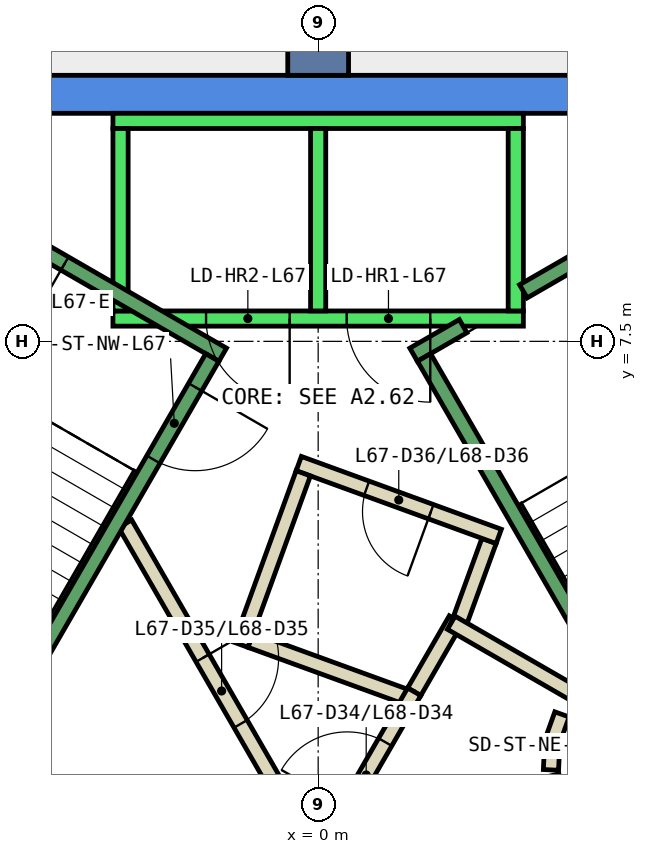
"""IFC4 building model, lengths in metres.
Left out: names, types, materials, properties, quantities, classifications, styles, units other than length and angle.
Written with IfcOpenShell. Run it as: python <this file> out.ifc"""

import sys

from ifc_helpers import new_model, si_unit, direction, frame, frame_2d, origin, place, context, subcontext, project, spatial, polyline, rectangle, outline, extrude, element, fill, save


model = new_model("IFC4")
c1 = context("Model", 3, precision=1e-05, world=origin(), true_north=direction((0.0, 1.0)))
c2 = subcontext(c1, "Body", "Model", "MODEL_VIEW")
j1 = project(units=[si_unit("LENGTHUNIT", "METRE"), si_unit("PLANEANGLEUNIT", "RADIAN")], contexts=[c1])
p1 = place(None, origin())
s1 = spatial("IfcSite", under=j1, at=p1, CompositionType="ELEMENT")
p2 = place(p1, origin())
s2 = spatial("IfcBuilding", under=s1, at=p2, CompositionType="ELEMENT")
p3 = place(p2, frame((0.0, 0.0, 290.0)))
s3 = spatial("IfcBuildingStorey", under=s2, at=p3, CompositionType="ELEMENT", Elevation=290.0)
p4 = place(p3, frame((0.0, 0.0, -0.34)))
e1 = element("IfcWall", 1, at=p4, inside=s3, PredefinedType="SHEAR", context=c2, shape_type="SweptSolid", body=[
    extrude(outline(polyline([(4.907, 11.0), (-4.907, 11.0), (-4.619, 10.5), (4.619, 10.5), (4.907, 11.0)])), origin(), (0.0, 0.0, 1.0), 3.6),
])
p5 = place(p3, frame((0.0, 11.0, -0.34), z_axis=(0.0, 0.0, 1.0), x_axis=(0.0, 1.0, 0.0)))
e2 = element("IfcWall", 2, at=p5, inside=s3, PredefinedType="SHEAR", context=c2, shape_type="SweptSolid", body=[
    extrude(rectangle(XDim=9.0, YDim=0.8, at=frame_2d((4.5, 0.0))), origin(), (0.0, 0.0, 1.0), 3.6),
])
p6 = place(p3, frame((1.264, 2.89, 0.0), z_axis=(0.0, 0.0, 1.0), x_axis=(0.500043792738, 0.866000118559, 0.0)))
e3 = element("IfcWall", 3, at=p6, inside=s3, PredefinedType="PARTITIONING", context=c2, shape_type="SweptSolid", body=[
    extrude(rectangle(XDim=1.096, YDim=0.2, at=frame_2d((0.548, 0.0))), origin(), (0.0, 0.0, 1.0), 3.26),
])
p7 = place(p3, frame((1.838, 3.748, 0.0), z_axis=(0.0, 0.0, 1.0), x_axis=(0.342266462435, 0.939602931398, 0.0)))
e4 = element("IfcWall", 4, at=p7, inside=s3, PredefinedType="PARTITIONING", context=c2, shape_type="SweptSolid", body=[
    extrude(rectangle(XDim=1.198, YDim=0.2, at=frame_2d((0.599, 0.0))), origin(), (0.0, 0.0, 1.0), 3.26),
])
p8 = place(p3, frame((2.376, 4.934, 0.0), z_axis=(0.0, 0.0, 1.0), x_axis=(-0.939640574808, 0.342163104635, 0.0)))
e5 = element("IfcWall", 5, at=p8, inside=s3, PredefinedType="PARTITIONING", context=c2, shape_type="SweptSolid", body=[
    extrude(rectangle(XDim=2.8, YDim=0.2, at=frame_2d((1.4, 0.0))), origin(), (0.0, 0.0, 1.0), 3.26),
])
p9 = place(p8, frame((0.95, 0.0, 0.0)))
e6 = element("IfcOpeningElement", 6, at=p9, cuts=e5, PredefinedType="OPENING", context=c2, shape_type="SweptSolid", body=[
    extrude(rectangle(XDim=0.9, YDim=2.1, at=frame_2d((0.45, 1.05))), frame((0.0, 0.11, 0.0), z_axis=(0.0, -1.0, 0.0), x_axis=(1.0, 0.0, 0.0)), (0.0, 0.0, 1.0), 0.22),
])
p10 = place(p3, frame((-0.196, 5.764, 0.0), z_axis=(0.0, 0.0, 1.0), x_axis=(-0.34165322761, -0.939826086073, 0.0)))
e7 = element("IfcWall", 7, at=p10, inside=s3, PredefinedType="PARTITIONING", context=c2, shape_type="SweptSolid", body=[
    extrude(rectangle(XDim=2.4, YDim=0.2, at=frame_2d((1.2, 0.0))), origin(), (0.0, 0.0, 1.0), 3.26),
])
p11 = place(p3, frame((-0.888, 3.568, 0.0), z_axis=(0.0, 0.0, 1.0), x_axis=(0.939685034098, -0.34204098686, 0.0)))
e8 = element("IfcWall", 8, at=p11, inside=s3, PredefinedType="PARTITIONING", context=c2, shape_type="SweptSolid", body=[
    extrude(rectangle(XDim=2.237, YDim=0.2, at=frame_2d((1.119, 0.0))), origin(), (0.0, 0.0, 1.0), 3.26),
])
p12 = place(p3, frame((2.62, 14.526, 0.0), z_axis=(0.0, 0.0, 1.0), x_axis=(0.527726136463, -0.84941457775, 0.0)))
e9 = element("IfcWall", 9, at=p12, inside=s3, PredefinedType="PARTITIONING", context=c2, shape_type="SweptSolid", body=[
    extrude(rectangle(XDim=4.165, YDim=0.2, at=frame_2d((2.083, 0.0))), origin(), (0.0, 0.0, 1.0), 2.4),
])
p13 = place(p12, frame((1.583, 0.0, 0.0)))
e10 = element("IfcOpeningElement", 10, at=p13, cuts=e9, PredefinedType="OPENING", context=c2, shape_type="SweptSolid", body=[
    extrude(rectangle(XDim=1.0, YDim=2.1, at=frame_2d((0.5, 1.05))), frame((0.0, 0.11, 0.0), z_axis=(0.0, -1.0, 0.0), x_axis=(1.0, 0.0, 0.0)), (0.0, 0.0, 1.0), 0.22),
])
p14 = place(p3, frame((0.05, 0.787, 0.0), z_axis=(0.0, 0.0, 1.0), x_axis=(0.499945861543, 0.866056658381, 0.0)))
e11 = element("IfcWall", 11, at=p14, inside=s3, PredefinedType="PARTITIONING", context=c2, shape_type="SweptSolid", body=[
    extrude(rectangle(XDim=2.428, YDim=0.2, at=frame_2d((1.214, 0.0))), origin(), (0.0, 0.0, 1.0), 3.26),
])
p15 = place(p14, frame((0.664, 0.0, 0.0)))
e12 = element("IfcOpeningElement", 12, at=p15, cuts=e11, PredefinedType="OPENING", context=c2, shape_type="SweptSolid", body=[
    extrude(rectangle(XDim=1.0, YDim=2.1, at=frame_2d((0.5, 1.05))), frame((0.0, 0.11, 0.0), z_axis=(0.0, -1.0, 0.0), x_axis=(1.0, 0.0, 0.0)), (0.0, 0.0, 1.0), 0.22),
])
p16 = place(p3, frame((1.751, 3.798, 0.0), z_axis=(0.0, 0.0, 1.0), x_axis=(0.866091650241, -0.499885240213, 0.0)))
e13 = element("IfcWall", 13, at=p16, inside=s3, PredefinedType="PARTITIONING", context=c2, shape_type="SweptSolid", body=[
    extrude(rectangle(XDim=1.991, YDim=0.2, at=frame_2d((0.995, 0.0))), origin(), (0.0, 0.0, 1.0), 3.26),
])
p17 = place(p3, frame((3.208, 2.592, 0.0), z_axis=(0.0, 0.0, 1.0), x_axis=(-0.337388820924, -0.941365382578, 0.0)))
e14 = element("IfcWall", 14, at=p17, inside=s3, PredefinedType="PARTITIONING", context=c2, shape_type="SweptSolid", body=[
    extrude(rectangle(XDim=0.338, YDim=0.2, at=frame_2d((0.169, 0.0))), origin(), (0.0, 0.0, 1.0), 3.26),
])
p18 = place(p3, frame((3.079, 2.199, 0.0), z_axis=(0.0, 0.0, 1.0), x_axis=(-0.047771483479, -0.998858290933, 0.0)))
e15 = element("IfcWall", 15, at=p18, inside=s3, PredefinedType="PARTITIONING", context=c2, shape_type="SweptSolid", body=[
    extrude(rectangle(XDim=0.337, YDim=0.2, at=frame_2d((0.169, 0.0))), origin(), (0.0, 0.0, 1.0), 3.26),
])
p19 = place(p3, frame((3.07, 1.786, 0.0), z_axis=(0.0, 0.0, 1.0), x_axis=(0.242705583207, -0.970099994784, 0.0)))
e16 = element("IfcWall", 16, at=p19, inside=s3, PredefinedType="PARTITIONING", context=c2, shape_type="SweptSolid", body=[
    extrude(rectangle(XDim=0.338, YDim=0.2, at=frame_2d((0.169, 0.0))), origin(), (0.0, 0.0, 1.0), 3.26),
])
p20 = place(p3, frame((-2.54, 5.1, 0.0), z_axis=(0.0, 0.0, 1.0), x_axis=(0.499925051871, -0.866068670783, 0.0)))
e17 = element("IfcWall", 17, at=p20, inside=s3, PredefinedType="PARTITIONING", context=c2, shape_type="SweptSolid", body=[
    extrude(rectangle(XDim=5.181, YDim=0.2, at=frame_2d((2.59, 0.0))), origin(), (0.0, 0.0, 1.0), 3.26),
])
p21 = place(p20, frame((2.04, 0.0, 0.0)))
e18 = element("IfcOpeningElement", 18, at=p21, cuts=e17, PredefinedType="OPENING", context=c2, shape_type="SweptSolid", body=[
    extrude(rectangle(XDim=1.0, YDim=2.1, at=frame_2d((0.5, 1.05))), frame((0.0, 0.11, 0.0), z_axis=(0.0, -1.0, 0.0), x_axis=(1.0, 0.0, 0.0)), (0.0, 0.0, 1.0), 0.22),
])
p22 = place(p3, frame((2.7, 7.8, 0.0), z_axis=(0.0, 0.0, 1.0), x_axis=(-1.0, 0.0, 0.0)))
e19 = element("IfcWall", 19, at=p22, inside=s3, PredefinedType="STANDARD", context=c2, shape_type="SweptSolid", body=[
    extrude(rectangle(XDim=5.4, YDim=0.2, at=frame_2d((2.7, 0.0))), origin(), (0.0, 0.0, 1.0), 3.26),
])
p23 = place(p22, frame((1.225, 0.0, 0.0)))
e20 = element("IfcOpeningElement", 20, at=p23, cuts=e19, PredefinedType="OPENING", context=c2, shape_type="SweptSolid", body=[
    extrude(rectangle(XDim=1.1, YDim=2.1, at=frame_2d((0.55, 1.05))), frame((0.0, 0.11, 0.0), z_axis=(0.0, -1.0, 0.0), x_axis=(1.0, 0.0, 0.0)), (0.0, 0.0, 1.0), 0.22),
])
p24 = place(p22, frame((3.075, 0.0, 0.0)))
e21 = element("IfcOpeningElement", 21, at=p24, cuts=e19, PredefinedType="OPENING", context=c2, shape_type="SweptSolid", body=[
    extrude(rectangle(XDim=1.1, YDim=2.1, at=frame_2d((0.55, 1.05))), frame((0.0, 0.11, 0.0), z_axis=(0.0, -1.0, 0.0), x_axis=(1.0, 0.0, 0.0)), (0.0, 0.0, 1.0), 0.22),
])
p25 = place(p3, frame((2.7, 10.4, 0.0), z_axis=(0.0, 0.0, 1.0), x_axis=(-1.0, 0.0, 0.0)))
e22 = element("IfcWall", 22, at=p25, inside=s3, PredefinedType="STANDARD", context=c2, shape_type="SweptSolid", body=[
    extrude(rectangle(XDim=5.4, YDim=0.2, at=frame_2d((2.7, 0.0))), origin(), (0.0, 0.0, 1.0), 3.26),
])
for number, where, z_axis, x_axis in (
    (23, (2.6, 7.9, 0.0), (0.0, 0.0, 1.0), (0.0, 1.0, 0.0)),
    (24, (0.0, 7.9, 0.0), (0.0, 0.0, 1.0), (0.0, 1.0, 0.0)),
    (25, (-2.6, 7.9, 0.0), (0.0, 0.0, 1.0), (0.0, 1.0, 0.0)),
):
    element("IfcWall", number, at=place(p3, frame(where, z_axis=z_axis, x_axis=x_axis)), inside=s3, PredefinedType="STANDARD", context=c2, shape_type="SweptSolid", body=[
        extrude(rectangle(XDim=2.4, YDim=0.2, at=frame_2d((1.2, 0.0))), origin(), (0.0, 0.0, 1.0), 3.26),
    ])
p26 = place(p3, frame((-5.94, 2.188, 0.0), z_axis=(0.0, 0.0, 1.0), x_axis=(0.500034260056, -0.866005622828, 0.0)))
e26 = element("IfcWall", 26, at=p26, inside=s3, PredefinedType="STANDARD", context=c2, shape_type="SweptSolid", body=[
    extrude(rectangle(XDim=5.399, YDim=0.2, at=frame_2d((2.7, 0.0))), origin(), (0.0, 0.0, 1.0), 3.26),
])
p27 = place(p26, frame((3.075, 0.0, 0.0)))
e27 = element("IfcOpeningElement", 27, at=p27, cuts=e26, PredefinedType="OPENING", context=c2, shape_type="SweptSolid", body=[
    extrude(rectangle(XDim=1.1, YDim=2.1, at=frame_2d((0.55, 1.05))), frame((0.0, 0.11, 0.0), z_axis=(0.0, -1.0, 0.0), x_axis=(1.0, 0.0, 0.0)), (0.0, 0.0, 1.0), 0.22),
])
p28 = place(p26, frame((1.225, 0.0, 0.0)))
e28 = element("IfcOpeningElement", 28, at=p28, cuts=e26, PredefinedType="OPENING", context=c2, shape_type="SweptSolid", body=[
    extrude(rectangle(XDim=1.1, YDim=2.1, at=frame_2d((0.55, 1.05))), frame((0.0, 0.11, 0.0), z_axis=(0.0, -1.0, 0.0), x_axis=(1.0, 0.0, 0.0)), (0.0, 0.0, 1.0), 0.22),
])
p29 = place(p3, frame((3.24, -2.488, 0.0), z_axis=(0.0, 0.0, 1.0), x_axis=(0.500034260056, 0.866005622828, 0.0)))
e29 = element("IfcWall", 29, at=p29, inside=s3, PredefinedType="STANDARD", context=c2, shape_type="SweptSolid", body=[
    extrude(rectangle(XDim=5.399, YDim=0.2, at=frame_2d((2.7, 0.0))), origin(), (0.0, 0.0, 1.0), 3.26),
])
p30 = place(p29, frame((3.225, 0.0, 0.0)))
e30 = element("IfcOpeningElement", 30, at=p30, cuts=e29, PredefinedType="OPENING", context=c2, shape_type="SweptSolid", body=[
    extrude(rectangle(XDim=1.1, YDim=2.1, at=frame_2d((0.55, 1.05))), frame((0.0, 0.11, 0.0), z_axis=(0.0, -1.0, 0.0), x_axis=(1.0, 0.0, 0.0)), (0.0, 0.0, 1.0), 0.22),
])
p31 = place(p29, frame((1.225, 0.0, 0.0)))
e31 = element("IfcOpeningElement", 31, at=p31, cuts=e29, PredefinedType="OPENING", context=c2, shape_type="SweptSolid", body=[
    extrude(rectangle(XDim=1.1, YDim=2.1, at=frame_2d((0.55, 1.05))), frame((0.0, 0.11, 0.0), z_axis=(0.0, -1.0, 0.0), x_axis=(1.0, 0.0, 0.0)), (0.0, 0.0, 1.0), 0.22),
])
p32 = place(p3, frame((2.7, 8.158, 0.0), z_axis=(0.0, 0.0, 1.0), x_axis=(0.86611865017, 0.499838457731, 0.0)))
e32 = element("IfcWall", 32, at=p32, inside=s3, PredefinedType="STANDARD", context=c2, shape_type="SweptSolid", body=[
    extrude(rectangle(XDim=2.733, YDim=0.2, at=frame_2d((1.366, 0.0))), origin(), (0.0, 0.0, 1.0), 3.26),
])
p33 = place(p3, frame((1.256, 7.324, 0.0), z_axis=(0.0, 0.0, 1.0), x_axis=(0.865915093549, 0.500191014278, 0.0)))
e33 = element("IfcWall", 33, at=p33, inside=s3, PredefinedType="STANDARD", context=c2, shape_type="SweptSolid", body=[
    extrude(rectangle(XDim=0.752, YDim=0.2, at=frame_2d((0.376, 0.0))), origin(), (0.0, 0.0, 1.0), 3.26),
])
p34 = place(p3, frame((4.843, 1.312, 0.0), z_axis=(0.0, 0.0, 1.0), x_axis=(-0.499963383562, 0.866046543262, 0.0)))
e34 = element("IfcWall", 34, at=p34, inside=s3, PredefinedType="STANDARD", context=c2, shape_type="SweptSolid", body=[
    extrude(rectangle(XDim=6.9, YDim=0.2, at=frame_2d((3.45, 0.0))), origin(), (0.0, 0.0, 1.0), 3.26),
])
p35 = place(p34, frame((0.45, 0.0, 0.0)))
e35 = element("IfcOpeningElement", 35, at=p35, cuts=e34, PredefinedType="OPENING", context=c2, shape_type="SweptSolid", body=[
    extrude(rectangle(XDim=1.1, YDim=2.2, at=frame_2d((0.55, 1.1))), frame((0.0, 0.11, 0.0), z_axis=(0.0, -1.0, 0.0), x_axis=(1.0, 0.0, 0.0)), (0.0, 0.0, 1.0), 0.22),
])
p36 = place(p3, frame((-1.256, 7.324, 0.0), z_axis=(0.0, 0.0, 1.0), x_axis=(-0.866046073146, 0.499964197906, 0.0)))
e36 = element("IfcWall", 36, at=p36, inside=s3, PredefinedType="STANDARD", context=c2, shape_type="SweptSolid", body=[
    extrude(rectangle(XDim=4.4, YDim=0.2, at=frame_2d((2.2, 0.0))), origin(), (0.0, 0.0, 1.0), 3.26),
])
p37 = place(p36, frame((2.4, 0.0, 0.0)))
e37 = element("IfcOpeningElement", 37, at=p37, cuts=e36, PredefinedType="OPENING", context=c2, shape_type="SweptSolid", body=[
    extrude(rectangle(XDim=1.1, YDim=2.2, at=frame_2d((0.55, 1.1))), frame((0.0, 0.11, 0.0), z_axis=(0.0, -1.0, 0.0), x_axis=(1.0, 0.0, 0.0)), (0.0, 0.0, 1.0), 0.22),
])
p38 = place(p3, frame((-1.393, 7.288, 0.0), z_axis=(0.0, 0.0, 1.0), x_axis=(-0.499963383562, -0.866046543262, 0.0)))
e38 = element("IfcWall", 38, at=p38, inside=s3, PredefinedType="STANDARD", context=c2, shape_type="SweptSolid", body=[
    extrude(rectangle(XDim=6.9, YDim=0.2, at=frame_2d((3.45, 0.0))), origin(), (0.0, 0.0, 1.0), 3.26),
])
p39 = place(p38, frame((0.45, 0.0, 0.0)))
e39 = element("IfcOpeningElement", 39, at=p39, cuts=e38, PredefinedType="OPENING", context=c2, shape_type="SweptSolid", body=[
    extrude(rectangle(XDim=1.1, YDim=2.2, at=frame_2d((0.55, 1.1))), frame((0.0, 0.11, 0.0), z_axis=(0.0, -1.0, 0.0), x_axis=(1.0, 0.0, 0.0)), (0.0, 0.0, 1.0), 0.22),
])
p40 = place(p15, origin())
e40 = element("IfcDoor", 40, at=p40, inside=s3, OperationType="SINGLE_SWING_RIGHT", PredefinedType="DOOR", context=c2, shape_type="SweptSolid", body=[
    extrude(rectangle(XDim=1.0, YDim=2.1, at=frame_2d((0.5, 1.05))), frame((0.0, 0.025, 0.0), z_axis=(0.0, -1.0, 0.0), x_axis=(1.0, 0.0, 0.0)), (0.0, 0.0, 1.0), 0.05),
])
fill(e12, e40)
p41 = place(p21, origin())
e41 = element("IfcDoor", 41, at=p41, inside=s3, OperationType="SINGLE_SWING_RIGHT", PredefinedType="DOOR", context=c2, shape_type="SweptSolid", body=[
    extrude(rectangle(XDim=1.0, YDim=2.1, at=frame_2d((0.5, 1.05))), frame((0.0, 0.025, 0.0), z_axis=(0.0, -1.0, 0.0), x_axis=(1.0, 0.0, 0.0)), (0.0, 0.0, 1.0), 0.05),
])
fill(e18, e41)
p42 = place(p9, origin())
e42 = element("IfcDoor", 42, at=p42, inside=s3, OperationType="SINGLE_SWING_LEFT", PredefinedType="DOOR", context=c2, shape_type="SweptSolid", body=[
    extrude(rectangle(XDim=0.9, YDim=2.1, at=frame_2d((0.45, 1.05))), frame((0.0, 0.025, 0.0), z_axis=(0.0, -1.0, 0.0), x_axis=(1.0, 0.0, 0.0)), (0.0, 0.0, 1.0), 0.05),
])
fill(e6, e42)
p43 = place(p23, origin())
e43 = element("IfcDoor", 43, at=p43, inside=s3, OperationType="SLIDING_TO_LEFT", PredefinedType="DOOR", context=c2, shape_type="SweptSolid", body=[
    extrude(rectangle(XDim=1.1, YDim=2.1, at=frame_2d((0.55, 1.05))), frame((0.0, 0.025, 0.0), z_axis=(0.0, -1.0, 0.0), x_axis=(1.0, 0.0, 0.0)), (0.0, 0.0, 1.0), 0.05),
])
fill(e20, e43)
p44 = place(p24, origin())
e44 = element("IfcDoor", 44, at=p44, inside=s3, OperationType="SLIDING_TO_LEFT", PredefinedType="DOOR", context=c2, shape_type="SweptSolid", body=[
    extrude(rectangle(XDim=1.1, YDim=2.1, at=frame_2d((0.55, 1.05))), frame((0.0, 0.025, 0.0), z_axis=(0.0, -1.0, 0.0), x_axis=(1.0, 0.0, 0.0)), (0.0, 0.0, 1.0), 0.05),
])
fill(e21, e44)
p45 = place(p39, origin())
e45 = element("IfcDoor", 45, at=p45, inside=s3, OperationType="SINGLE_SWING_LEFT", PredefinedType="DOOR", context=c2, shape_type="SweptSolid", body=[
    extrude(rectangle(XDim=1.1, YDim=2.2, at=frame_2d((0.55, 1.1))), frame((0.0, 0.025, 0.0), z_axis=(0.0, -1.0, 0.0), x_axis=(1.0, 0.0, 0.0)), (0.0, 0.0, 1.0), 0.05),
])
fill(e39, e45)
p46 = place(p37, origin())
e46 = element("IfcDoor", 46, at=p46, inside=s3, OperationType="SINGLE_SWING_LEFT", PredefinedType="DOOR", context=c2, shape_type="SweptSolid", body=[
    extrude(rectangle(XDim=1.1, YDim=2.2, at=frame_2d((0.55, 1.1))), frame((0.0, 0.025, 0.0), z_axis=(0.0, -1.0, 0.0), x_axis=(1.0, 0.0, 0.0)), (0.0, 0.0, 1.0), 0.05),
])
fill(e37, e46)
save(model, sys.argv[1])
